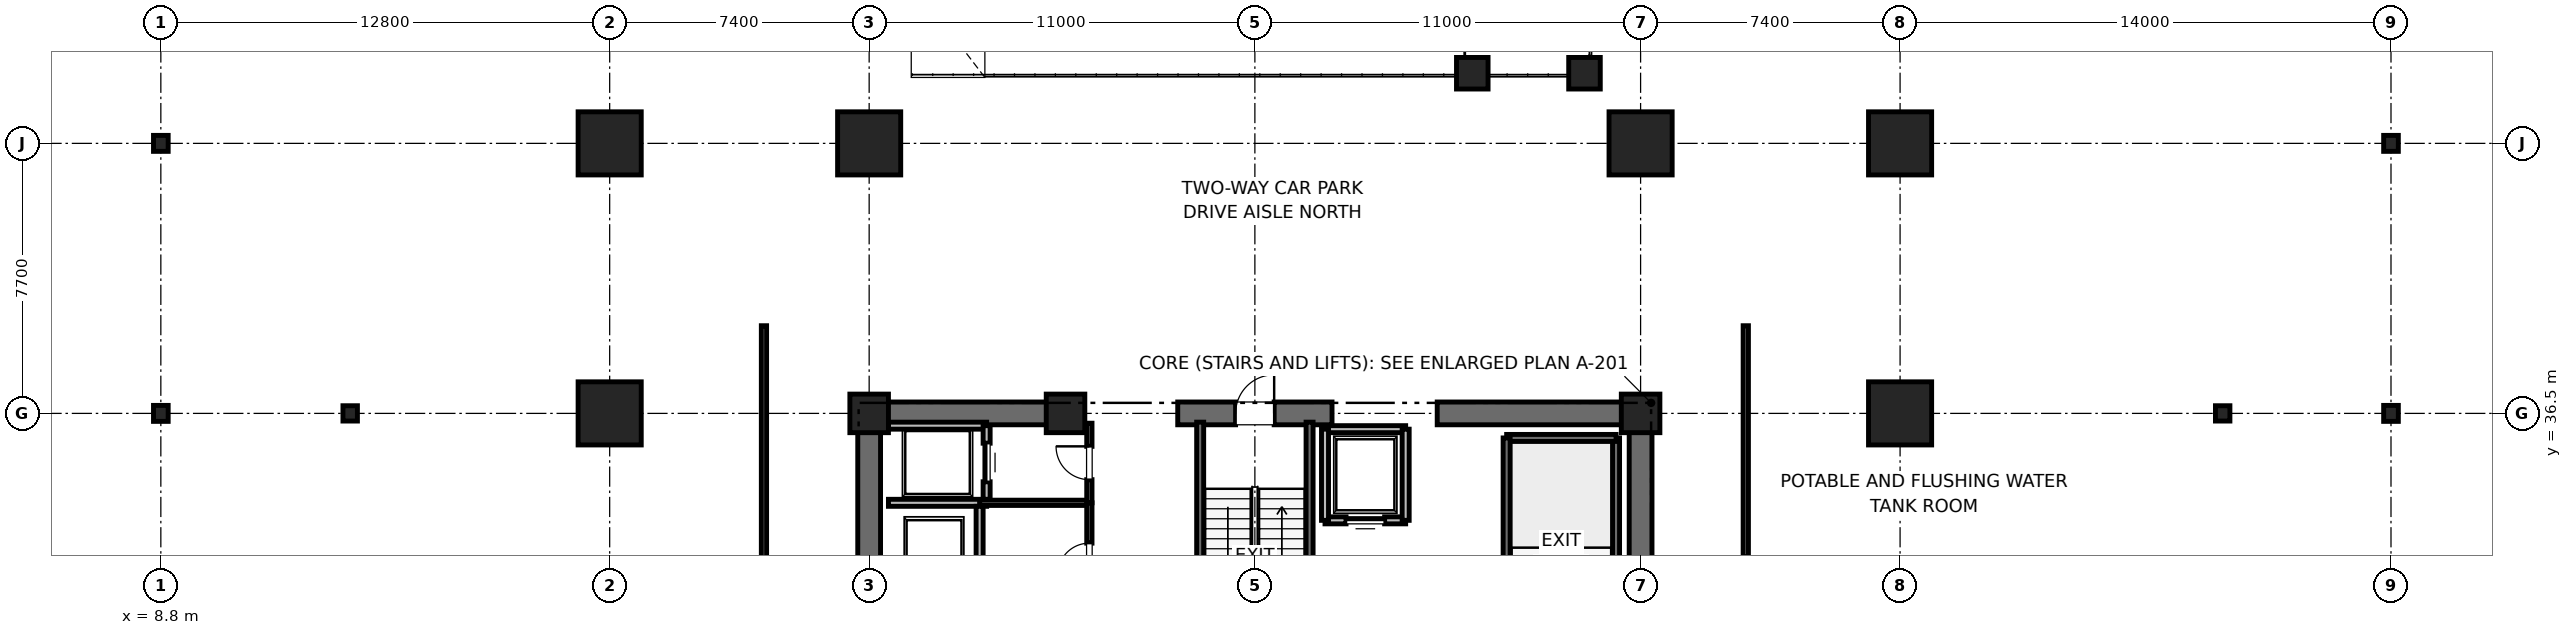
"""IFC4 building model, lengths in metres.
Left out: names, types, materials, properties, quantities, classifications, styles, units other than length and angle.
Written with IfcOpenShell. Run it as: python <this file> out.ifc"""

import sys

from ifc_helpers import new_model, si_unit, direction, frame, frame_2d, origin, origin_2d, place, context, subcontext, project, spatial, rectangle, i_section, extrude, element, fill, save


model = new_model("IFC4")
c1 = context("Model", 3, precision=1e-05, world=origin(), true_north=direction((0.0, 1.0)))
c2 = subcontext(c1, "Body", "Model", "MODEL_VIEW")
j1 = project(units=[si_unit("LENGTHUNIT", "METRE"), si_unit("PLANEANGLEUNIT", "RADIAN")], contexts=[c1])
p1 = place(None, origin())
s1 = spatial("IfcSite", under=j1, at=p1, CompositionType="ELEMENT")
p2 = place(p1, origin())
s2 = spatial("IfcBuilding", under=s1, at=p2, CompositionType="ELEMENT")
p3 = place(p2, frame((0.0, 0.0, -9.0)))
s3 = spatial("IfcBuildingStorey", under=s2, at=p3, CompositionType="ELEMENT", Elevation=-9.0)
for number, where, z_axis, x_axis in (
    (1, (29.0, 44.2, -0.3), (0.0, 0.0, 1.0), (1.0, 0.0, 0.0)),
    (2, (51.0, 44.2, -0.3), (0.0, 0.0, 1.0), (1.0, 0.0, 0.0)),
    (3, (21.6, 36.5, -0.3), (0.0, 0.0, 1.0), (1.0, 0.0, 0.0)),
    (4, (58.4, 36.5, -0.3), (0.0, 0.0, 1.0), (1.0, 0.0, 0.0)),
    (5, (21.6, 44.2, -0.3), (0.0, 0.0, 1.0), (1.0, 0.0, 0.0)),
    (6, (58.4, 44.2, -0.3), (0.0, 0.0, 1.0), (1.0, 0.0, 0.0)),
):
    element("IfcColumn", number, at=place(p3, frame(where, z_axis=z_axis, x_axis=x_axis)), inside=s3, PredefinedType="COLUMN", context=c2, shape_type="SweptSolid", body=[
        extrude(rectangle(XDim=1.8, YDim=1.8, at=origin_2d()), origin(), (0.0, 0.0, 1.0), 4.8),
    ])
for number, where, z_axis, x_axis in (
    (7, (14.2, 36.5, -0.3), (0.0, 0.0, 1.0), (1.0, 0.0, 0.0)),
    (8, (67.6, 36.5, -0.3), (0.0, 0.0, 1.0), (1.0, 0.0, 0.0)),
):
    element("IfcColumn", number, at=place(p3, frame(where, z_axis=z_axis, x_axis=x_axis)), inside=s3, PredefinedType="COLUMN", context=c2, shape_type="SweptSolid", body=[
        extrude(i_section(OverallWidth=0.412, OverallDepth=0.437, WebThickness=0.036, FlangeThickness=0.058, FilletRadius=0.015, at=origin_2d()), origin(), (0.0, 0.0, 1.0), 4.8),
    ])
for number, where, z_axis, x_axis in (
    (9, (29.0, 36.5, -0.3), (0.0, 0.0, 1.0), (1.0, 0.0, 0.0)),
    (10, (51.0, 36.5, -0.3), (0.0, 0.0, 1.0), (1.0, 0.0, 0.0)),
    (11, (34.6, 36.5, -0.3), (0.0, 0.0, 1.0), (1.0, 0.0, 0.0)),
):
    element("IfcColumn", number, at=place(p3, frame(where, z_axis=z_axis, x_axis=x_axis)), inside=s3, PredefinedType="PILASTER", context=c2, shape_type="SweptSolid", body=[
        extrude(rectangle(XDim=1.1, YDim=1.1, at=origin_2d()), origin(), (0.0, 0.0, 1.0), 4.8),
    ])
for number, where, z_axis, x_axis in (
    (12, (8.8, 36.5, -0.3), (0.0, 0.0, 1.0), (1.0, 0.0, 0.0)),
    (13, (8.8, 44.2, -0.3), (0.0, 0.0, 1.0), (1.0, 0.0, 0.0)),
    (14, (72.4, 36.5, -0.3), (0.0, 0.0, 1.0), (1.0, 0.0, 0.0)),
    (15, (72.4, 44.2, -0.3), (0.0, 0.0, 1.0), (1.0, 0.0, 0.0)),
):
    element("IfcColumn", number, at=place(p3, frame(where, z_axis=z_axis, x_axis=x_axis)), inside=s3, PredefinedType="COLUMN", context=c2, shape_type="SweptSolid", body=[
        extrude(i_section(OverallWidth=0.418, OverallDepth=0.456, WebThickness=0.042, FlangeThickness=0.067, FilletRadius=0.015, at=origin_2d()), origin(), (0.0, 0.0, 1.0), 4.8),
    ])
p4 = place(p3, frame((29.0, 36.5, -0.3), z_axis=(0.0, 0.0, 1.0), x_axis=(1.0, 0.0, 0.0)))
e16 = element("IfcWall", 16, at=p4, inside=s3, PredefinedType="SHEAR", context=c2, shape_type="SweptSolid", body=[
    extrude(rectangle(XDim=5.8, YDim=0.65, at=frame_2d((2.9, 0.0))), origin(), (0.0, 0.0, 1.0), 4.5),
])
p5 = place(p3, frame((37.8, 36.5, -0.3), z_axis=(0.0, 0.0, 1.0), x_axis=(1.0, 0.0, 0.0)))
e17 = element("IfcWall", 17, at=p5, inside=s3, PredefinedType="SHEAR", context=c2, shape_type="SweptSolid", body=[
    extrude(rectangle(XDim=4.4, YDim=0.65, at=frame_2d((2.2, 0.0))), origin(), (0.0, 0.0, 1.0), 4.5),
])
p6 = place(p5, frame((1.65, 0.0, 0.3)))
e18 = element("IfcOpeningElement", 18, at=p6, cuts=e17, PredefinedType="OPENING", context=c2, shape_type="SweptSolid", body=[
    extrude(rectangle(XDim=1.1, YDim=2.15, at=frame_2d((0.55, 1.075))), frame((0.0, 0.325, 0.0), z_axis=(0.0, -1.0, 0.0), x_axis=(1.0, 0.0, 0.0)), (0.0, 0.0, 1.0), 0.65),
])
for number, where, z_axis, x_axis in (
    (19, (45.2, 36.5, -0.3), (0.0, 0.0, 1.0), (1.0, 0.0, 0.0)),
    (20, (29.0, 30.7, -0.3), (0.0, 0.0, 1.0), (0.0, 1.0, 0.0)),
):
    element("IfcWall", number, at=place(p3, frame(where, z_axis=z_axis, x_axis=x_axis)), inside=s3, PredefinedType="SHEAR", context=c2, shape_type="SweptSolid", body=[
        extrude(rectangle(XDim=5.8, YDim=0.65, at=frame_2d((2.9, 0.0))), origin(), (0.0, 0.0, 1.0), 4.5),
    ])
p7 = place(p3, frame((51.0, 27.7, -0.3), z_axis=(0.0, 0.0, 1.0), x_axis=(0.0, 1.0, 0.0)))
e21 = element("IfcWall", 21, at=p7, inside=s3, PredefinedType="SHEAR", context=c2, shape_type="SweptSolid", body=[
    extrude(rectangle(XDim=8.8, YDim=0.65, at=frame_2d((4.4, 0.0))), origin(), (0.0, 0.0, 1.0), 4.5),
])
for number, where, z_axis, x_axis in (
    (22, (46.2, 46.2, -0.3), (0.0, 0.0, 1.0), (1.0, 0.0, 0.0)),
    (23, (49.4, 46.2, -0.3), (0.0, 0.0, 1.0), (1.0, 0.0, 0.0)),
):
    element("IfcColumn", number, at=place(p3, frame(where, z_axis=z_axis, x_axis=x_axis)), inside=s3, PredefinedType="COLUMN", context=c2, shape_type="SweptSolid", body=[
        extrude(rectangle(XDim=0.9, YDim=0.9, at=origin_2d()), origin(), (0.0, 0.0, 1.0), 2.55),
    ])
p8 = place(p3, frame((50.3, 27.65, -0.3), z_axis=(0.0, 0.0, 1.0), x_axis=(0.0, 1.0, 0.0)))
e24 = element("IfcWall", 24, at=p8, inside=s3, PredefinedType="SOLIDWALL", context=c2, shape_type="SweptSolid", body=[
    extrude(rectangle(XDim=8.15, YDim=0.2, at=frame_2d((4.075, 0.0))), origin(), (0.0, 0.0, 1.0), 4.5),
])
p9 = place(p3, frame((47.18, 35.8, -0.3), z_axis=(0.0, 0.0, 1.0), x_axis=(1.0, 0.0, 0.0)))
e25 = element("IfcWall", 25, at=p9, inside=s3, PredefinedType="SOLIDWALL", context=c2, shape_type="SweptSolid", body=[
    extrude(rectangle(XDim=3.12, YDim=0.2, at=frame_2d((1.56, 0.0))), origin(), (0.0, 0.0, 1.0), 4.5),
])
p10 = place(p3, frame((47.18, 27.62, -0.3), z_axis=(0.0, 0.0, 1.0), x_axis=(0.0, 1.0, 0.0)))
e26 = element("IfcWall", 26, at=p10, inside=s3, PredefinedType="SOLIDWALL", context=c2, shape_type="SweptSolid", body=[
    extrude(rectangle(XDim=8.18, YDim=0.2, at=frame_2d((4.09, 0.0))), origin(), (0.0, 0.0, 1.0), 4.5),
])
p11 = place(p3, frame((38.44, 27.38, -0.3), z_axis=(0.0, 0.0, 1.0), x_axis=(0.0, 1.0, 0.0)))
e27 = element("IfcWall", 27, at=p11, inside=s3, PredefinedType="SOLIDWALL", context=c2, shape_type="SweptSolid", body=[
    extrude(rectangle(XDim=8.87, YDim=0.2, at=frame_2d((4.435, 0.0))), origin(), (0.0, 0.0, 1.0), 4.5),
])
p12 = place(p3, frame((41.56, 27.68, -0.3), z_axis=(0.0, 0.0, 1.0), x_axis=(0.0, 1.0, 0.0)))
e28 = element("IfcWall", 28, at=p12, inside=s3, PredefinedType="SOLIDWALL", context=c2, shape_type="SweptSolid", body=[
    extrude(rectangle(XDim=8.57, YDim=0.2, at=frame_2d((4.285, 0.0))), origin(), (0.0, 0.0, 1.0), 4.5),
])
p13 = place(p3, frame((29.55, 33.95, 0.0), z_axis=(0.0, 0.0, 1.0), x_axis=(1.0, 0.0, 0.0)))
e29 = element("IfcWall", 29, at=p13, inside=s3, PredefinedType="SOLIDWALL", context=c2, shape_type="SweptSolid", body=[
    extrude(rectangle(XDim=2.8, YDim=0.2, at=frame_2d((1.4, 0.0))), origin(), (0.0, 0.0, 1.0), 4.2),
])
p14 = place(p3, frame((32.15, 30.85, 0.0), z_axis=(0.0, 0.0, 1.0), x_axis=(0.0, 1.0, 0.0)))
e30 = element("IfcWall", 30, at=p14, inside=s3, PredefinedType="SOLIDWALL", context=c2, shape_type="SweptSolid", body=[
    extrude(rectangle(XDim=3.0, YDim=0.2, at=frame_2d((1.5, 0.0))), origin(), (0.0, 0.0, 1.0), 4.2),
])
p15 = place(p3, frame((32.35, 36.15, 0.0), z_axis=(0.0, 0.0, 1.0), x_axis=(-1.0, 0.0, 0.0)))
e31 = element("IfcWall", 31, at=p15, inside=s3, PredefinedType="SOLIDWALL", context=c2, shape_type="SweptSolid", body=[
    extrude(rectangle(XDim=2.8, YDim=0.2, at=frame_2d((1.4, 0.0))), origin(), (0.0, 0.0, 1.0), 3.38),
])
p16 = place(p3, frame((32.35, 34.05, 0.0), z_axis=(0.0, 0.0, 1.0), x_axis=(0.0, 1.0, 0.0)))
e32 = element("IfcWall", 32, at=p16, inside=s3, PredefinedType="SOLIDWALL", context=c2, shape_type="SweptSolid", body=[
    extrude(rectangle(XDim=2.1, YDim=0.2, at=frame_2d((1.05, 0.0))), origin(), (0.0, 0.0, 1.0), 4.2),
])
p17 = place(p16, frame((0.5, 0.0, 0.0)))
e33 = element("IfcOpeningElement", 33, at=p17, cuts=e32, PredefinedType="OPENING", context=c2, shape_type="SweptSolid", body=[
    extrude(rectangle(XDim=1.1, YDim=2.2, at=frame_2d((0.55, 1.1))), frame((0.0, 0.1, 0.0), z_axis=(0.0, -1.0, 0.0), x_axis=(1.0, 0.0, 0.0)), (0.0, 0.0, 1.0), 0.2),
])
p18 = place(p3, frame((42.0, 33.45, 0.0), z_axis=(0.0, 0.0, 1.0), x_axis=(1.0, 0.0, 0.0)))
e34 = element("IfcWall", 34, at=p18, inside=s3, PredefinedType="SOLIDWALL", context=c2, shape_type="SweptSolid", body=[
    extrude(rectangle(XDim=2.3, YDim=0.2, at=frame_2d((1.15, 0.0))), origin(), (0.0, 0.0, 1.0), 4.2),
])
p19 = place(p18, frame((0.6, 0.0, 0.0)))
e35 = element("IfcOpeningElement", 35, at=p19, cuts=e34, PredefinedType="OPENING", context=c2, shape_type="SweptSolid", body=[
    extrude(rectangle(XDim=1.1, YDim=2.2, at=frame_2d((0.55, 1.1))), frame((0.0, 0.1, 0.0), z_axis=(0.0, -1.0, 0.0), x_axis=(1.0, 0.0, 0.0)), (0.0, 0.0, 1.0), 0.2),
])
p20 = place(p3, frame((44.3, 36.05, 0.0), z_axis=(0.0, 0.0, 1.0), x_axis=(-1.0, 0.0, 0.0)))
e36 = element("IfcWall", 36, at=p20, inside=s3, PredefinedType="SOLIDWALL", context=c2, shape_type="SweptSolid", body=[
    extrude(rectangle(XDim=2.3, YDim=0.2, at=frame_2d((1.15, 0.0))), origin(), (0.0, 0.0, 1.0), 2.98),
])
for number, where, z_axis, x_axis in (
    (37, (42.0, 36.05, 0.0), (0.0, 0.0, 1.0), (0.0, -1.0, 0.0)),
    (38, (44.3, 33.45, 0.0), (0.0, 0.0, 1.0), (0.0, 1.0, 0.0)),
):
    element("IfcWall", number, at=place(p3, frame(where, z_axis=z_axis, x_axis=x_axis)), inside=s3, PredefinedType="SOLIDWALL", context=c2, shape_type="SweptSolid", body=[
        extrude(rectangle(XDim=2.6, YDim=0.2, at=frame_2d((1.3, 0.0))), origin(), (0.0, 0.0, 1.0), 2.98),
    ])
p21 = place(p3, frame((32.15, 33.95, 0.0), z_axis=(0.0, 0.0, 1.0), x_axis=(1.0, 0.0, 0.0)))
e39 = element("IfcWall", 39, at=p21, inside=s3, PredefinedType="PARTITIONING", context=c2, shape_type="SweptSolid", body=[
    extrude(rectangle(XDim=3.13, YDim=0.15, at=frame_2d((1.565, 0.0))), origin(), (0.0, 0.0, 1.0), 2.85),
])
p22 = place(p3, frame((35.28, 33.95, 0.0), z_axis=(0.0, 0.0, 1.0), x_axis=(0.0, 1.0, 0.0)))
e40 = element("IfcWall", 40, at=p22, inside=s3, PredefinedType="PARTITIONING", context=c2, shape_type="SweptSolid", body=[
    extrude(rectangle(XDim=2.27, YDim=0.15, at=frame_2d((1.135, 0.0))), origin(), (0.0, 0.0, 1.0), 2.85),
])
p23 = place(p22, frame((0.66, 0.0, 0.0)))
e41 = element("IfcOpeningElement", 41, at=p23, cuts=e40, PredefinedType="OPENING", context=c2, shape_type="SweptSolid", body=[
    extrude(rectangle(XDim=0.95, YDim=2.15, at=frame_2d((0.475, 1.075))), frame((0.0, 0.075, 0.0), z_axis=(0.0, -1.0, 0.0), x_axis=(1.0, 0.0, 0.0)), (0.0, 0.0, 1.0), 0.15),
])
p24 = place(p3, frame((35.28, 30.75, 0.0), z_axis=(0.0, 0.0, 1.0), x_axis=(0.0, 1.0, 0.0)))
e42 = element("IfcWall", 42, at=p24, inside=s3, PredefinedType="PARTITIONING", context=c2, shape_type="SweptSolid", body=[
    extrude(rectangle(XDim=3.2, YDim=0.15, at=frame_2d((1.6, 0.0))), origin(), (0.0, 0.0, 1.0), 2.85),
])
p25 = place(p24, frame((1.15, 0.0, 0.0)))
e43 = element("IfcOpeningElement", 43, at=p25, cuts=e42, PredefinedType="OPENING", context=c2, shape_type="SweptSolid", body=[
    extrude(rectangle(XDim=0.9, YDim=2.1, at=frame_2d((0.45, 1.05))), frame((0.0, 0.075, 0.0), z_axis=(0.0, -1.0, 0.0), x_axis=(1.0, 0.0, 0.0)), (0.0, 0.0, 1.0), 0.15),
])
p26 = place(p3, frame((26.0, 14.0, 0.0), z_axis=(0.0, 0.0, 1.0), x_axis=(0.0, 1.0, 0.0)))
e44 = element("IfcWall", 44, at=p26, inside=s3, PredefinedType="PARTITIONING", context=c2, shape_type="SweptSolid", body=[
    extrude(rectangle(XDim=25.0, YDim=0.15, at=frame_2d((12.5, 0.0))), origin(), (0.0, 0.0, 1.0), 2.85),
])
p27 = place(p26, frame((12.7, 0.0, 0.0)))
e45 = element("IfcOpeningElement", 45, at=p27, cuts=e44, PredefinedType="OPENING", context=c2, shape_type="SweptSolid", body=[
    extrude(rectangle(XDim=1.6, YDim=2.25, at=frame_2d((0.8, 1.125))), frame((0.0, 0.075, 0.0), z_axis=(0.0, -1.0, 0.0), x_axis=(1.0, 0.0, 0.0)), (0.0, 0.0, 1.0), 0.15),
])
p28 = place(p3, frame((54.0, 26.8, 0.0), z_axis=(0.0, 0.0, 1.0), x_axis=(0.0, 1.0, 0.0)))
e46 = element("IfcWall", 46, at=p28, inside=s3, PredefinedType="PARTITIONING", context=c2, shape_type="SweptSolid", body=[
    extrude(rectangle(XDim=12.2, YDim=0.15, at=frame_2d((6.1, 0.0))), origin(), (0.0, 0.0, 1.0), 2.85),
])
p29 = place(p28, frame((4.0, 0.0, 0.0)))
e47 = element("IfcOpeningElement", 47, at=p29, cuts=e46, PredefinedType="OPENING", context=c2, shape_type="SweptSolid", body=[
    extrude(rectangle(XDim=1.6, YDim=2.25, at=frame_2d((0.8, 1.125))), frame((0.0, 0.075, 0.0), z_axis=(0.0, -1.0, 0.0), x_axis=(1.0, 0.0, 0.0)), (0.0, 0.0, 1.0), 0.15),
])
p30 = place(p6, origin())
e48 = element("IfcDoor", 48, at=p30, inside=s3, OperationType="SINGLE_SWING_RIGHT", PredefinedType="DOOR", context=c2, shape_type="SweptSolid", body=[
    extrude(rectangle(XDim=1.1, YDim=2.15, at=frame_2d((0.55, 1.075))), frame((0.0, 0.025, 0.0), z_axis=(0.0, -1.0, 0.0), x_axis=(1.0, 0.0, 0.0)), (0.0, 0.0, 1.0), 0.05),
])
fill(e18, e48)
p31 = place(p17, origin())
e49 = element("IfcDoor", 49, at=p31, inside=s3, OperationType="SLIDING_TO_RIGHT", PredefinedType="DOOR", context=c2, shape_type="SweptSolid", body=[
    extrude(rectangle(XDim=1.1, YDim=2.2, at=frame_2d((0.55, 1.1))), frame((0.0, 0.025, 0.0), z_axis=(0.0, -1.0, 0.0), x_axis=(1.0, 0.0, 0.0)), (0.0, 0.0, 1.0), 0.05),
])
fill(e33, e49)
p32 = place(p19, origin())
e50 = element("IfcDoor", 50, at=p32, inside=s3, OperationType="SLIDING_TO_RIGHT", PredefinedType="DOOR", context=c2, shape_type="SweptSolid", body=[
    extrude(rectangle(XDim=1.1, YDim=2.2, at=frame_2d((0.55, 1.1))), frame((0.0, 0.025, 0.0), z_axis=(0.0, -1.0, 0.0), x_axis=(1.0, 0.0, 0.0)), (0.0, 0.0, 1.0), 0.05),
])
fill(e35, e50)
p33 = place(p23, origin())
e51 = element("IfcDoor", 51, at=p33, inside=s3, OperationType="SINGLE_SWING_RIGHT", PredefinedType="DOOR", context=c2, shape_type="SweptSolid", body=[
    extrude(rectangle(XDim=0.95, YDim=2.15, at=frame_2d((0.475, 1.075))), frame((0.0, 0.025, 0.0), z_axis=(0.0, -1.0, 0.0), x_axis=(1.0, 0.0, 0.0)), (0.0, 0.0, 1.0), 0.05),
])
fill(e41, e51)
p34 = place(p25, origin())
e52 = element("IfcDoor", 52, at=p34, inside=s3, OperationType="SINGLE_SWING_LEFT", PredefinedType="DOOR", context=c2, shape_type="SweptSolid", body=[
    extrude(rectangle(XDim=0.9, YDim=2.1, at=frame_2d((0.45, 1.05))), frame((0.0, 0.025, 0.0), z_axis=(0.0, -1.0, 0.0), x_axis=(1.0, 0.0, 0.0)), (0.0, 0.0, 1.0), 0.05),
])
fill(e43, e52)
save(model, sys.argv[1])
